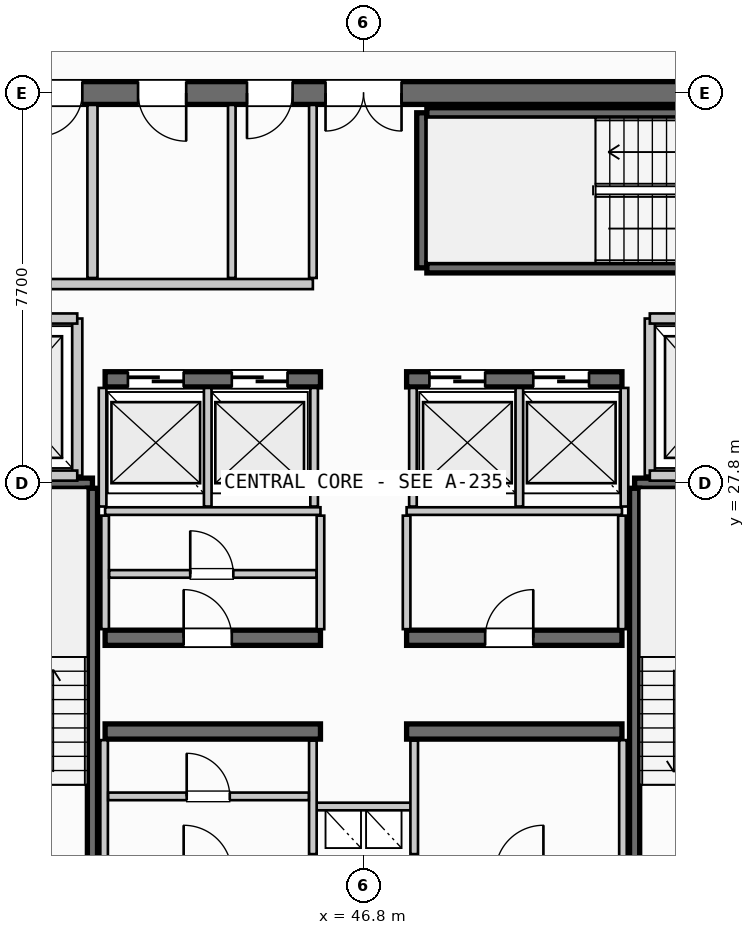
"""IFC4 building model, lengths in metres.
Left out: names, types, materials, properties, quantities, classifications, styles, units other than length and angle.
Written with IfcOpenShell. Run it as: python <this file> out.ifc"""

import sys

from ifc_helpers import new_model, si_unit, direction, frame, frame_2d, origin, place, context, subcontext, project, spatial, rectangle, extrude, source, transform, mapped, element, fill, save


model = new_model("IFC4")
c1 = context("Model", 3, precision=1e-05, world=origin(), true_north=direction((0.0, 1.0)))
c2 = subcontext(c1, "Body", "Model", "MODEL_VIEW")
j1 = project(units=[si_unit("LENGTHUNIT", "METRE"), si_unit("PLANEANGLEUNIT", "RADIAN")], contexts=[c1])
p1 = place(None, origin())
s1 = spatial("IfcSite", under=j1, at=p1, CompositionType="ELEMENT")
p2 = place(p1, origin())
s2 = spatial("IfcBuilding", under=s1, at=p2, CompositionType="ELEMENT")
p3 = place(p2, frame((0.0, 0.0, 252.55)))
s3 = spatial("IfcBuildingStorey", under=s2, at=p3, CompositionType="ELEMENT", Elevation=252.55)
p4 = place(p3, frame((55.6, 35.5, 0.0), z_axis=(0.0, 0.0, 1.0), x_axis=(-1.0, 0.0, 0.0)))
e1 = element("IfcWall", 1, at=p4, inside=s3, PredefinedType="SHEAR", context=c2, shape_type="SweptSolid", body=[
    extrude(rectangle(XDim=17.6, YDim=0.45, at=frame_2d((8.8, 0.0))), origin(), (0.0, 0.0, 1.0), 3.21),
])
p5 = place(p4, frame((8.05, 0.0, 0.0)))
e2 = element("IfcOpeningElement", 2, at=p5, cuts=e1, PredefinedType="OPENING", context=c2, shape_type="SweptSolid", body=[
    extrude(rectangle(XDim=1.5, YDim=2.2, at=frame_2d((0.75, 1.1))), frame((0.0, 0.235, 0.0), z_axis=(0.0, -1.0, 0.0), x_axis=(1.0, 0.0, 0.0)), (0.0, 0.0, 1.0), 0.47),
])
p6 = place(p4, frame((15.85, 0.0, 0.0)))
e3 = element("IfcOpeningElement", 3, at=p6, cuts=e1, PredefinedType="OPENING", context=c2, shape_type="SweptSolid", body=[
    extrude(rectangle(XDim=0.85, YDim=2.15, at=frame_2d((0.425, 1.075))), frame((0.0, 0.235, 0.0), z_axis=(0.0, -1.0, 0.0), x_axis=(1.0, 0.0, 0.0)), (0.0, 0.0, 1.0), 0.47),
])
p7 = place(p4, frame((14.35, 0.0, 0.0)))
e4 = element("IfcOpeningElement", 4, at=p7, cuts=e1, PredefinedType="OPENING", context=c2, shape_type="SweptSolid", body=[
    extrude(rectangle(XDim=0.85, YDim=2.15, at=frame_2d((0.425, 1.075))), frame((0.0, 0.235, 0.0), z_axis=(0.0, -1.0, 0.0), x_axis=(1.0, 0.0, 0.0)), (0.0, 0.0, 1.0), 0.47),
])
p8 = place(p4, frame((12.3, 0.0, 0.0)))
e5 = element("IfcOpeningElement", 5, at=p8, cuts=e1, PredefinedType="OPENING", context=c2, shape_type="SweptSolid", body=[
    extrude(rectangle(XDim=0.95, YDim=2.15, at=frame_2d((0.475, 1.075))), frame((0.0, 0.235, 0.0), z_axis=(0.0, -1.0, 0.0), x_axis=(1.0, 0.0, 0.0)), (0.0, 0.0, 1.0), 0.47),
])
p9 = place(p4, frame((10.2, 0.0, 0.0)))
e6 = element("IfcOpeningElement", 6, at=p9, cuts=e1, PredefinedType="OPENING", context=c2, shape_type="SweptSolid", body=[
    extrude(rectangle(XDim=0.9, YDim=2.15, at=frame_2d((0.45, 1.075))), frame((0.0, 0.235, 0.0), z_axis=(0.0, -1.0, 0.0), x_axis=(1.0, 0.0, 0.0)), (0.0, 0.0, 1.0), 0.47),
])
for number, where, z_axis, x_axis in (
    (7, (41.7, 22.9, 0.0), (0.0, 0.0, 1.0), (1.0, 0.0, 0.0)),
    (8, (47.65, 22.9, 0.0), (0.0, 0.0, 1.0), (1.0, 0.0, 0.0)),
):
    element("IfcWall", number, at=place(p3, frame(where, z_axis=z_axis, x_axis=x_axis)), inside=s3, PredefinedType="SHEAR", context=c2, shape_type="SweptSolid", body=[
        extrude(rectangle(XDim=4.25, YDim=0.3, at=frame_2d((2.125, 0.0))), origin(), (0.0, 0.0, 1.0), 3.21),
    ])
p10 = place(p3, frame((41.7, 24.75, 0.0), z_axis=(0.0, 0.0, 1.0), x_axis=(1.0, 0.0, 0.0)))
e9 = element("IfcWall", 9, at=p10, inside=s3, PredefinedType="SHEAR", context=c2, shape_type="SweptSolid", body=[
    extrude(rectangle(XDim=4.25, YDim=0.3, at=frame_2d((2.125, 0.0))), origin(), (0.0, 0.0, 1.0), 3.21),
])
p11 = place(p10, frame((1.55, 0.0, 0.0)))
e10 = element("IfcOpeningElement", 10, at=p11, cuts=e9, PredefinedType="OPENING", context=c2, shape_type="SweptSolid", body=[
    extrude(rectangle(XDim=0.95, YDim=2.15, at=frame_2d((0.475, 1.075))), frame((0.0, 0.16, 0.0), z_axis=(0.0, -1.0, 0.0), x_axis=(1.0, 0.0, 0.0)), (0.0, 0.0, 1.0), 0.32),
])
p12 = place(p3, frame((47.65, 24.75, 0.0), z_axis=(0.0, 0.0, 1.0), x_axis=(1.0, 0.0, 0.0)))
e11 = element("IfcWall", 11, at=p12, inside=s3, PredefinedType="SHEAR", context=c2, shape_type="SweptSolid", body=[
    extrude(rectangle(XDim=4.25, YDim=0.3, at=frame_2d((2.125, 0.0))), origin(), (0.0, 0.0, 1.0), 3.21),
])
p13 = place(p12, frame((1.55, 0.0, 0.0)))
e12 = element("IfcOpeningElement", 12, at=p13, cuts=e11, PredefinedType="OPENING", context=c2, shape_type="SweptSolid", body=[
    extrude(rectangle(XDim=0.95, YDim=2.15, at=frame_2d((0.475, 1.075))), frame((0.0, 0.16, 0.0), z_axis=(0.0, -1.0, 0.0), x_axis=(1.0, 0.0, 0.0)), (0.0, 0.0, 1.0), 0.32),
])
p14 = place(p3, frame((41.7, 29.85, 0.0), z_axis=(0.0, 0.0, 1.0), x_axis=(1.0, 0.0, 0.0)))
e13 = element("IfcWall", 13, at=p14, inside=s3, PredefinedType="SHEAR", context=c2, shape_type="SweptSolid", body=[
    extrude(rectangle(XDim=4.25, YDim=0.3, at=frame_2d((2.125, 0.0))), origin(), (0.0, 0.0, 1.0), 3.21),
])
p15 = place(p14, frame((0.45, 0.0, 0.0)))
e14 = element("IfcOpeningElement", 14, at=p15, cuts=e13, PredefinedType="OPENING", context=c2, shape_type="SweptSolid", body=[
    extrude(rectangle(XDim=1.1, YDim=2.2, at=frame_2d((0.55, 1.1))), frame((0.0, 0.16, 0.0), z_axis=(0.0, -1.0, 0.0), x_axis=(1.0, 0.0, 0.0)), (0.0, 0.0, 1.0), 0.32),
])
p16 = place(p14, frame((2.5, 0.0, 0.0)))
e15 = element("IfcOpeningElement", 15, at=p16, cuts=e13, PredefinedType="OPENING", context=c2, shape_type="SweptSolid", body=[
    extrude(rectangle(XDim=1.1, YDim=2.2, at=frame_2d((0.55, 1.1))), frame((0.0, 0.16, 0.0), z_axis=(0.0, -1.0, 0.0), x_axis=(1.0, 0.0, 0.0)), (0.0, 0.0, 1.0), 0.32),
])
p17 = place(p3, frame((47.65, 29.85, 0.0), z_axis=(0.0, 0.0, 1.0), x_axis=(1.0, 0.0, 0.0)))
e16 = element("IfcWall", 16, at=p17, inside=s3, PredefinedType="SHEAR", context=c2, shape_type="SweptSolid", body=[
    extrude(rectangle(XDim=4.25, YDim=0.3, at=frame_2d((2.125, 0.0))), origin(), (0.0, 0.0, 1.0), 3.21),
])
p18 = place(p17, frame((0.45, 0.0, 0.0)))
e17 = element("IfcOpeningElement", 17, at=p18, cuts=e16, PredefinedType="OPENING", context=c2, shape_type="SweptSolid", body=[
    extrude(rectangle(XDim=1.1, YDim=2.2, at=frame_2d((0.55, 1.1))), frame((0.0, 0.16, 0.0), z_axis=(0.0, -1.0, 0.0), x_axis=(1.0, 0.0, 0.0)), (0.0, 0.0, 1.0), 0.32),
])
p19 = place(p17, frame((2.5, 0.0, 0.0)))
e18 = element("IfcOpeningElement", 18, at=p19, cuts=e16, PredefinedType="OPENING", context=c2, shape_type="SweptSolid", body=[
    extrude(rectangle(XDim=1.1, YDim=2.2, at=frame_2d((0.55, 1.1))), frame((0.0, 0.16, 0.0), z_axis=(0.0, -1.0, 0.0), x_axis=(1.0, 0.0, 0.0)), (0.0, 0.0, 1.0), 0.32),
])
p20 = place(p3, frame((38.39, 27.8, 0.0), z_axis=(0.0, 0.0, 1.0), x_axis=(1.0, 0.0, 0.0)))
e19 = element("IfcWall", 19, at=p20, inside=s3, PredefinedType="SHEAR", context=c2, shape_type="SweptSolid", body=[
    extrude(rectangle(XDim=3.06, YDim=0.2, at=frame_2d((1.53, 0.0))), origin(), (0.0, 0.0, 1.0), 3.21),
])
p21 = place(p3, frame((41.45, 27.7, 0.0), z_axis=(0.0, 0.0, 1.0), x_axis=(0.0, -1.0, 0.0)))
e20 = element("IfcWall", 20, at=p21, inside=s3, PredefinedType="SHEAR", context=c2, shape_type="SweptSolid", body=[
    extrude(rectangle(XDim=7.35, YDim=0.2, at=frame_2d((3.675, 0.0))), origin(), (0.0, 0.0, 1.0), 3.21),
])
p22 = place(p3, frame((52.15, 27.8, 0.0), z_axis=(0.0, 0.0, 1.0), x_axis=(1.0, 0.0, 0.0)))
e21 = element("IfcWall", 21, at=p22, inside=s3, PredefinedType="SHEAR", context=c2, shape_type="SweptSolid", body=[
    extrude(rectangle(XDim=3.06, YDim=0.2, at=frame_2d((1.53, 0.0))), origin(), (0.0, 0.0, 1.0), 3.21),
])
p23 = place(p3, frame((52.15, 20.35, 0.0), z_axis=(0.0, 0.0, 1.0), x_axis=(0.0, 1.0, 0.0)))
e22 = element("IfcWall", 22, at=p23, inside=s3, PredefinedType="SHEAR", context=c2, shape_type="SweptSolid", body=[
    extrude(rectangle(XDim=7.35, YDim=0.2, at=frame_2d((3.675, 0.0))), origin(), (0.0, 0.0, 1.0), 3.21),
])
p24 = place(p3, frame((47.95, 32.05, 0.0), z_axis=(0.0, 0.0, 1.0), x_axis=(0.0, 1.0, 0.0)))
e23 = element("IfcWall", 23, at=p24, inside=s3, PredefinedType="SHEAR", context=c2, shape_type="SweptSolid", body=[
    extrude(rectangle(XDim=3.06, YDim=0.2, at=frame_2d((1.53, 0.0))), origin(), (0.0, 0.0, 1.0), 3.21),
])
for number, where, z_axis, x_axis in (
    (24, (48.05, 35.11, 0.0), (0.0, 0.0, 1.0), (1.0, 0.0, 0.0)),
    (25, (55.4, 32.05, 0.0), (0.0, 0.0, 1.0), (-1.0, 0.0, 0.0)),
):
    element("IfcWall", number, at=place(p3, frame(where, z_axis=z_axis, x_axis=x_axis)), inside=s3, PredefinedType="SHEAR", context=c2, shape_type="SweptSolid", body=[
        extrude(rectangle(XDim=7.35, YDim=0.2, at=frame_2d((3.675, 0.0))), origin(), (0.0, 0.0, 1.0), 3.21),
    ])
p25 = place(p3, frame((45.8, 21.42, 0.0), z_axis=(0.0, 0.0, 1.0), x_axis=(1.0, 0.0, 0.0)))
e26 = element("IfcWall", 26, at=p25, inside=s3, PredefinedType="PARTITIONING", context=c2, shape_type="SweptSolid", body=[
    extrude(rectangle(XDim=2.0, YDim=0.15, at=frame_2d((1.0, 0.0))), origin(), (0.0, 0.0, 1.0), 2.28),
])
for number, where, z_axis, x_axis in (
    (27, (45.8, 20.48, 0.0), (0.0, 0.0, 1.0), (0.0, 1.0, 0.0)),
    (28, (47.8, 20.48, 0.0), (0.0, 0.0, 1.0), (0.0, 1.0, 0.0)),
):
    element("IfcWall", number, at=place(p3, frame(where, z_axis=z_axis, x_axis=x_axis)), inside=s3, PredefinedType="PARTITIONING", context=c2, shape_type="SweptSolid", body=[
        extrude(rectangle(XDim=2.24, YDim=0.15, at=frame_2d((1.12, 0.0))), origin(), (0.0, 0.0, 1.0), 2.28),
    ])
p26 = place(p3, frame((41.15, 27.95, 0.0), z_axis=(0.0, 0.0, 1.0), x_axis=(0.0, 1.0, 0.0)))
e29 = element("IfcWall", 29, at=p26, inside=s3, PredefinedType="PARTITIONING", context=c2, shape_type="SweptSolid", body=[
    extrude(rectangle(XDim=3.1, YDim=0.2, at=frame_2d((1.55, 0.0))), origin(), (0.0, 0.0, 1.0), 2.28),
])
for number, where, z_axis, x_axis in (
    (30, (38.235, 27.95, 0.0), (0.0, 0.0, 1.0), (1.0, 0.0, 0.0)),
    (31, (38.235, 31.05, 0.0), (0.0, 0.0, 1.0), (1.0, 0.0, 0.0)),
):
    element("IfcWall", number, at=place(p3, frame(where, z_axis=z_axis, x_axis=x_axis)), inside=s3, PredefinedType="PARTITIONING", context=c2, shape_type="SweptSolid", body=[
        extrude(rectangle(XDim=2.915, YDim=0.2, at=frame_2d((1.458, 0.0))), origin(), (0.0, 0.0, 1.0), 2.28),
    ])
p27 = place(p3, frame((52.45, 27.95, 0.0), z_axis=(0.0, 0.0, 1.0), x_axis=(0.0, 1.0, 0.0)))
e32 = element("IfcWall", 32, at=p27, inside=s3, PredefinedType="PARTITIONING", context=c2, shape_type="SweptSolid", body=[
    extrude(rectangle(XDim=3.1, YDim=0.2, at=frame_2d((1.55, 0.0))), origin(), (0.0, 0.0, 1.0), 2.28),
])
for number, where, z_axis, x_axis in (
    (33, (52.45, 27.95, 0.0), (0.0, 0.0, 1.0), (1.0, 0.0, 0.0)),
    (34, (52.45, 31.05, 0.0), (0.0, 0.0, 1.0), (1.0, 0.0, 0.0)),
):
    element("IfcWall", number, at=place(p3, frame(where, z_axis=z_axis, x_axis=x_axis)), inside=s3, PredefinedType="PARTITIONING", context=c2, shape_type="SweptSolid", body=[
        extrude(rectangle(XDim=2.915, YDim=0.2, at=frame_2d((1.458, 0.0))), origin(), (0.0, 0.0, 1.0), 2.28),
    ])
for number, where, z_axis, x_axis in (
    (35, (41.68, 20.335, 0.0), (0.0, 0.0, 1.0), (0.0, 1.0, 0.0)),
    (36, (51.92, 20.335, 0.0), (0.0, 0.0, 1.0), (0.0, 1.0, 0.0)),
):
    element("IfcWall", number, at=place(p3, frame(where, z_axis=z_axis, x_axis=x_axis)), inside=s3, PredefinedType="PARTITIONING", context=c2, shape_type="SweptSolid", body=[
        extrude(rectangle(XDim=2.395, YDim=0.15, at=frame_2d((1.198, 0.0))), origin(), (0.0, 0.0, 1.0), 2.28),
    ])
p28 = place(p3, frame((41.76, 21.62, 0.0), z_axis=(0.0, 0.0, 1.0), x_axis=(1.0, 0.0, 0.0)))
e37 = element("IfcWall", 37, at=p28, inside=s3, PredefinedType="PARTITIONING", context=c2, shape_type="SweptSolid", body=[
    extrude(rectangle(XDim=3.96, YDim=0.15, at=frame_2d((1.98, 0.0))), origin(), (0.0, 0.0, 1.0), 2.28),
])
p29 = place(p28, frame((1.55, 0.0, 0.0)))
e38 = element("IfcOpeningElement", 38, at=p29, cuts=e37, PredefinedType="OPENING", context=c2, shape_type="SweptSolid", body=[
    extrude(rectangle(XDim=0.85, YDim=2.15, at=frame_2d((0.425, 1.075))), frame((0.0, 0.085, 0.0), z_axis=(0.0, -1.0, 0.0), x_axis=(1.0, 0.0, 0.0)), (0.0, 0.0, 1.0), 0.17),
])
for number, where, z_axis, x_axis in (
    (39, (41.7, 27.25, 0.0), (0.0, 0.0, 1.0), (1.0, 0.0, 0.0)),
    (40, (47.65, 27.25, 0.0), (0.0, 0.0, 1.0), (1.0, 0.0, 0.0)),
):
    element("IfcWall", number, at=place(p3, frame(where, z_axis=z_axis, x_axis=x_axis)), inside=s3, PredefinedType="PARTITIONING", context=c2, shape_type="SweptSolid", body=[
        extrude(rectangle(XDim=4.25, YDim=0.15, at=frame_2d((2.125, 0.0))), origin(), (0.0, 0.0, 1.0), 2.28),
    ])
for number, where, z_axis, x_axis in (
    (41, (41.7, 24.92, 0.0), (0.0, 0.0, 1.0), (0.0, 1.0, 0.0)),
    (42, (45.95, 24.92, 0.0), (0.0, 0.0, 1.0), (0.0, 1.0, 0.0)),
    (43, (47.65, 24.92, 0.0), (0.0, 0.0, 1.0), (0.0, 1.0, 0.0)),
    (44, (51.9, 24.92, 0.0), (0.0, 0.0, 1.0), (0.0, 1.0, 0.0)),
):
    element("IfcWall", number, at=place(p3, frame(where, z_axis=z_axis, x_axis=x_axis)), inside=s3, PredefinedType="PARTITIONING", context=c2, shape_type="SweptSolid", body=[
        extrude(rectangle(XDim=2.24, YDim=0.15, at=frame_2d((1.12, 0.0))), origin(), (0.0, 0.0, 1.0), 2.28),
    ])
p30 = place(p3, frame((41.78, 26.01, 0.0), z_axis=(0.0, 0.0, 1.0), x_axis=(1.0, 0.0, 0.0)))
e45 = element("IfcWall", 45, at=p30, inside=s3, PredefinedType="PARTITIONING", context=c2, shape_type="SweptSolid", body=[
    extrude(rectangle(XDim=4.09, YDim=0.15, at=frame_2d((2.045, 0.0))), origin(), (0.0, 0.0, 1.0), 2.28),
])
p31 = place(p30, frame((1.6, 0.0, 0.0)))
e46 = element("IfcOpeningElement", 46, at=p31, cuts=e45, PredefinedType="OPENING", context=c2, shape_type="SweptSolid", body=[
    extrude(rectangle(XDim=0.85, YDim=2.15, at=frame_2d((0.425, 1.075))), frame((0.0, 0.085, 0.0), z_axis=(0.0, -1.0, 0.0), x_axis=(1.0, 0.0, 0.0)), (0.0, 0.0, 1.0), 0.17),
])
for number, where, z_axis, x_axis in (
    (47, (41.65, 27.34, 0.0), (0.0, 0.0, 1.0), (0.0, 1.0, 0.0)),
    (48, (43.725, 27.34, 0.0), (0.0, 0.0, 1.0), (0.0, 1.0, 0.0)),
    (49, (45.825, 27.34, 0.0), (0.0, 0.0, 1.0), (0.0, 1.0, 0.0)),
    (50, (47.775, 27.34, 0.0), (0.0, 0.0, 1.0), (0.0, 1.0, 0.0)),
    (51, (49.875, 27.34, 0.0), (0.0, 0.0, 1.0), (0.0, 1.0, 0.0)),
    (52, (51.95, 27.34, 0.0), (0.0, 0.0, 1.0), (0.0, 1.0, 0.0)),
):
    element("IfcWall", number, at=place(p3, frame(where, z_axis=z_axis, x_axis=x_axis)), inside=s3, PredefinedType="PARTITIONING", context=c2, shape_type="SweptSolid", body=[
        extrude(rectangle(XDim=2.34, YDim=0.15, at=frame_2d((1.17, 0.0))), origin(), (0.0, 0.0, 1.0), 2.28),
    ])
p32 = place(p3, frame((41.45, 31.85, 0.0), z_axis=(0.0, 0.0, 1.0), x_axis=(0.0, 1.0, 0.0)))
e53 = element("IfcWall", 53, at=p32, inside=s3, PredefinedType="PARTITIONING", context=c2, shape_type="SweptSolid", body=[
    extrude(rectangle(XDim=3.415, YDim=0.2, at=frame_2d((1.708, 0.0))), origin(), (0.0, 0.0, 1.0), 2.28),
])
p33 = place(p3, frame((38.235, 31.73, 0.0), z_axis=(0.0, 0.0, 1.0), x_axis=(1.0, 0.0, 0.0)))
e54 = element("IfcWall", 54, at=p33, inside=s3, PredefinedType="PARTITIONING", context=c2, shape_type="SweptSolid", body=[
    extrude(rectangle(XDim=7.565, YDim=0.2, at=frame_2d((3.782, 0.0))), origin(), (0.0, 0.0, 1.0), 2.28),
])
p34 = place(p3, frame((45.8, 31.85, 0.0), z_axis=(0.0, 0.0, 1.0), x_axis=(0.0, 1.0, 0.0)))
e55 = element("IfcWall", 55, at=p34, inside=s3, PredefinedType="PARTITIONING", context=c2, shape_type="SweptSolid", body=[
    extrude(rectangle(XDim=3.415, YDim=0.15, at=frame_2d((1.708, 0.0))), origin(), (0.0, 0.0, 1.0), 2.28),
])
p35 = place(p3, frame((44.2, 31.85, 0.0), z_axis=(0.0, 0.0, 1.0), x_axis=(0.0, 1.0, 0.0)))
e56 = element("IfcWall", 56, at=p35, inside=s3, PredefinedType="PLUMBINGWALL", context=c2, shape_type="SweptSolid", body=[
    extrude(rectangle(XDim=3.415, YDim=0.15, at=frame_2d((1.708, 0.0))), origin(), (0.0, 0.0, 1.0), 2.28),
])
m1 = source(origin(), c2, "Body", "SweptSolid", [
    extrude(rectangle(XDim=1.5, YDim=2.2, at=frame_2d((0.75, 1.1))), frame((0.0, 0.025, 0.0), z_axis=(0.0, -1.0, 0.0), x_axis=(1.0, 0.0, 0.0)), (0.0, 0.0, 1.0), 0.05),
])
p36 = place(p5, origin())
e57 = element("IfcDoor", 57, at=p36, inside=s3, OperationType="DOUBLE_DOOR_SINGLE_SWING", PredefinedType="DOOR", context=c2, shape_type="MappedRepresentation", body=[
    mapped(m1, transform((0.0, 0.0, 0.0), scale=1.0)),
])
fill(e2, e57)
m2 = source(origin(), c2, "Body", "SweptSolid", [
    extrude(rectangle(XDim=0.95, YDim=2.15, at=frame_2d((0.475, 1.075))), frame((0.0, 0.025, 0.0), z_axis=(0.0, -1.0, 0.0), x_axis=(1.0, 0.0, 0.0)), (0.0, 0.0, 1.0), 0.05),
])
p37 = place(p11, origin())
e58 = element("IfcDoor", 58, at=p37, inside=s3, OperationType="SINGLE_SWING_LEFT", PredefinedType="DOOR", context=c2, shape_type="MappedRepresentation", body=[
    mapped(m2, transform((0.0, 0.0, 0.0), scale=1.0)),
])
fill(e10, e58)
p38 = place(p13, origin())
e59 = element("IfcDoor", 59, at=p38, inside=s3, OperationType="SINGLE_SWING_RIGHT", PredefinedType="DOOR", context=c2, shape_type="MappedRepresentation", body=[
    mapped(m2, transform((0.0, 0.0, 0.0), scale=1.0)),
])
fill(e12, e59)
m3 = source(origin(), c2, "Body", "SweptSolid", [
    extrude(rectangle(XDim=1.1, YDim=2.2, at=frame_2d((0.55, 1.1))), frame((0.0, 0.025, 0.0), z_axis=(0.0, -1.0, 0.0), x_axis=(1.0, 0.0, 0.0)), (0.0, 0.0, 1.0), 0.05),
])
p39 = place(p15, origin())
e60 = element("IfcDoor", 60, at=p39, inside=s3, OperationType="SLIDING_TO_LEFT", PredefinedType="DOOR", context=c2, shape_type="MappedRepresentation", body=[
    mapped(m3, transform((0.0, 0.0, 0.0), scale=1.0)),
])
fill(e14, e60)
p40 = place(p16, origin())
e61 = element("IfcDoor", 61, at=p40, inside=s3, OperationType="SLIDING_TO_LEFT", PredefinedType="DOOR", context=c2, shape_type="MappedRepresentation", body=[
    mapped(m3, transform((0.0, 0.0, 0.0), scale=1.0)),
])
fill(e15, e61)
p41 = place(p18, origin())
e62 = element("IfcDoor", 62, at=p41, inside=s3, OperationType="SLIDING_TO_LEFT", PredefinedType="DOOR", context=c2, shape_type="MappedRepresentation", body=[
    mapped(m3, transform((0.0, 0.0, 0.0), scale=1.0)),
])
fill(e17, e62)
p42 = place(p19, origin())
e63 = element("IfcDoor", 63, at=p42, inside=s3, OperationType="SLIDING_TO_LEFT", PredefinedType="DOOR", context=c2, shape_type="MappedRepresentation", body=[
    mapped(m3, transform((0.0, 0.0, 0.0), scale=1.0)),
])
fill(e18, e63)
m4 = source(origin(), c2, "Body", "SweptSolid", [
    extrude(rectangle(XDim=0.85, YDim=2.15, at=frame_2d((0.425, 1.075))), frame((0.0, 0.025, 0.0), z_axis=(0.0, -1.0, 0.0), x_axis=(1.0, 0.0, 0.0)), (0.0, 0.0, 1.0), 0.05),
])
p43 = place(p7, origin())
e64 = element("IfcDoor", 64, at=p43, inside=s3, OperationType="SINGLE_SWING_RIGHT", PredefinedType="DOOR", context=c2, shape_type="MappedRepresentation", body=[
    mapped(m4, transform((0.0, 0.0, 0.0), scale=1.0)),
])
fill(e4, e64)
p44 = place(p8, origin())
e65 = element("IfcDoor", 65, at=p44, inside=s3, OperationType="SINGLE_SWING_LEFT", PredefinedType="DOOR", context=c2, shape_type="MappedRepresentation", body=[
    mapped(m2, transform((0.0, 0.0, 0.0), scale=1.0)),
])
fill(e5, e65)
m5 = source(origin(), c2, "Body", "SweptSolid", [
    extrude(rectangle(XDim=0.9, YDim=2.15, at=frame_2d((0.45, 1.075))), frame((0.0, 0.025, 0.0), z_axis=(0.0, -1.0, 0.0), x_axis=(1.0, 0.0, 0.0)), (0.0, 0.0, 1.0), 0.05),
])
p45 = place(p9, origin())
e66 = element("IfcDoor", 66, at=p45, inside=s3, OperationType="SINGLE_SWING_RIGHT", PredefinedType="DOOR", context=c2, shape_type="MappedRepresentation", body=[
    mapped(m5, transform((0.0, 0.0, 0.0), scale=1.0)),
])
fill(e6, e66)
p46 = place(p29, origin())
e67 = element("IfcDoor", 67, at=p46, inside=s3, OperationType="SINGLE_SWING_LEFT", PredefinedType="DOOR", context=c2, shape_type="MappedRepresentation", body=[
    mapped(m4, transform((0.0, 0.0, 0.0), scale=1.0)),
])
fill(e38, e67)
p47 = place(p31, origin())
e68 = element("IfcDoor", 68, at=p47, inside=s3, OperationType="SINGLE_SWING_LEFT", PredefinedType="DOOR", context=c2, shape_type="MappedRepresentation", body=[
    mapped(m4, transform((0.0, 0.0, 0.0), scale=1.0)),
])
fill(e46, e68)
save(model, sys.argv[1])
